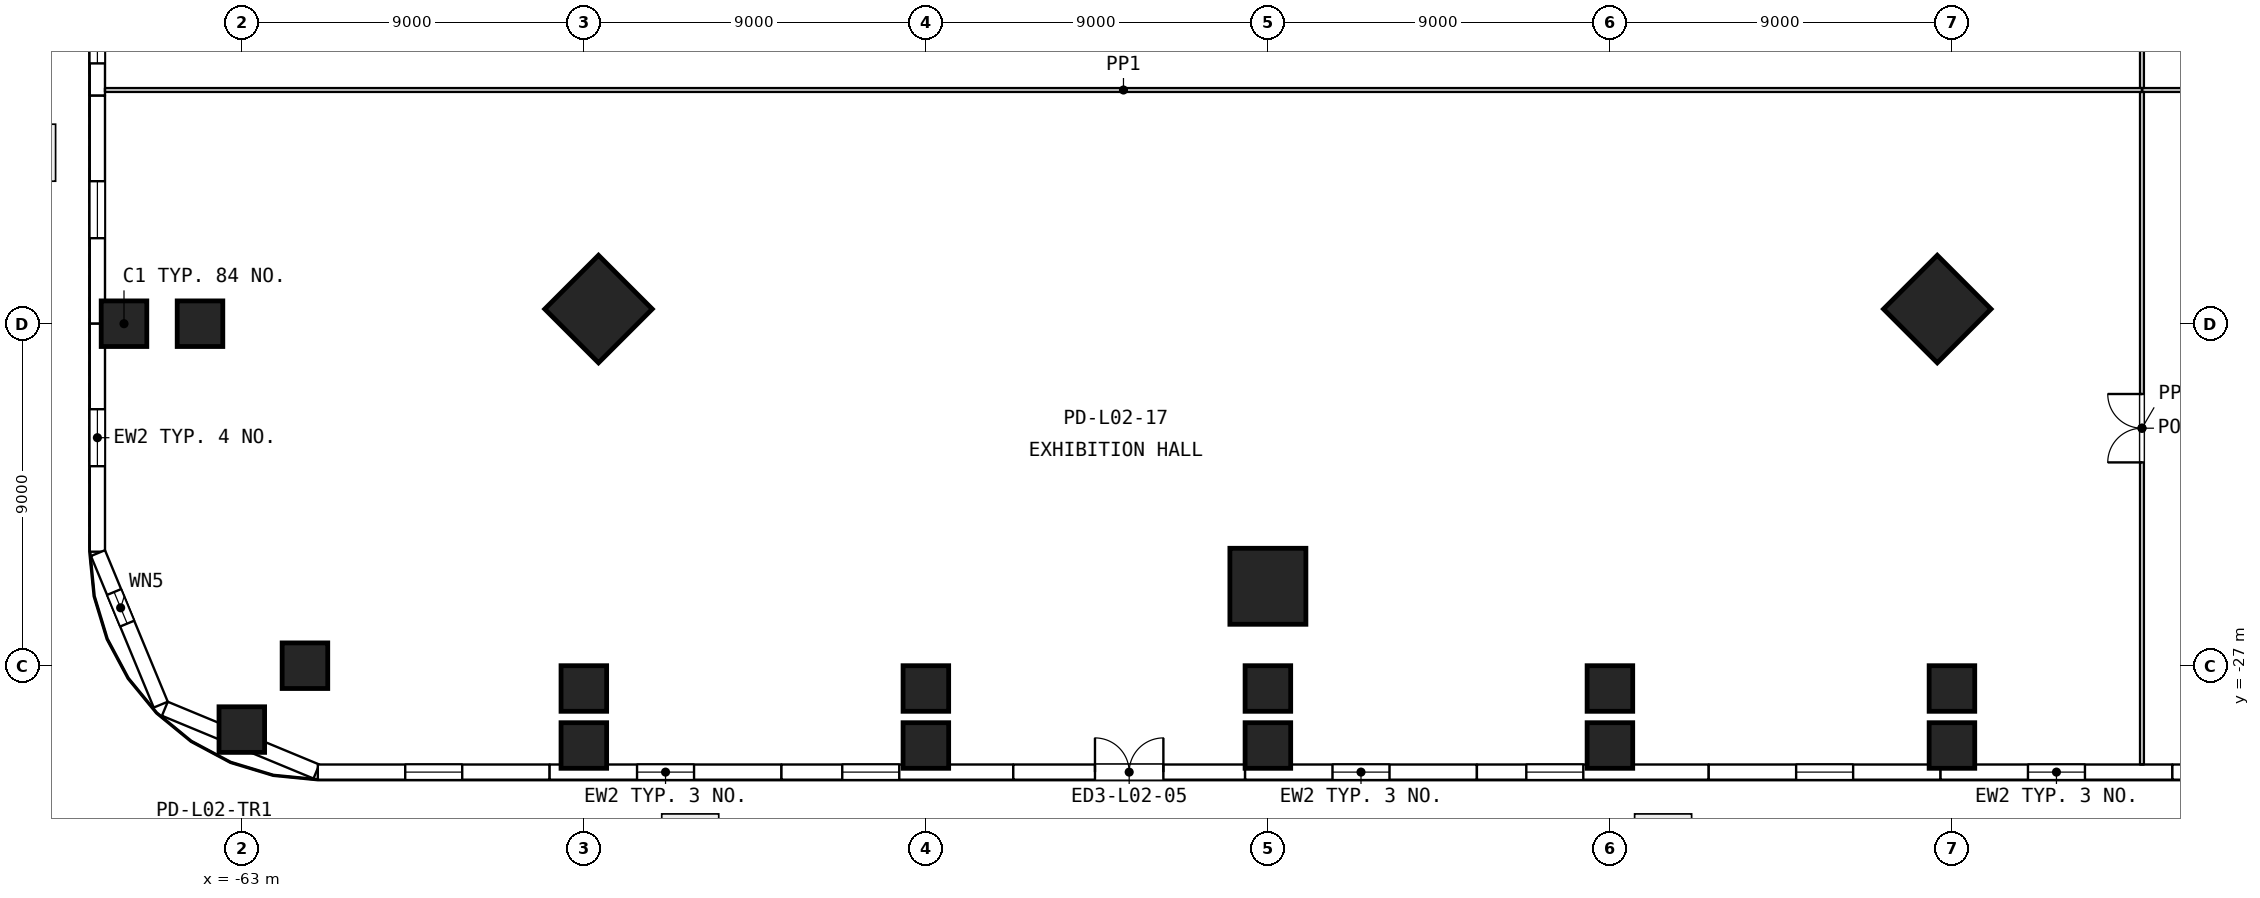
"""IFC4 building model, lengths in metres.
Left out: names, types, materials, properties, quantities, classifications, styles, units other than length and angle.
Written with IfcOpenShell. Run it as: python <this file> out.ifc"""

import sys

from ifc_helpers import new_model, si_unit, direction, frame, frame_2d, origin, origin_2d, place, context, subcontext, project, spatial, rectangle, extrude, element, fill, save


model = new_model("IFC4")
c1 = context("Model", 3, precision=1e-05, world=origin(), true_north=direction((0.0, 1.0)))
c2 = subcontext(c1, "Body", "Model", "MODEL_VIEW")
j1 = project(units=[si_unit("LENGTHUNIT", "METRE"), si_unit("PLANEANGLEUNIT", "RADIAN")], contexts=[c1])
p1 = place(None, origin())
s1 = spatial("IfcSite", under=j1, at=p1, CompositionType="ELEMENT")
p2 = place(p1, origin())
s2 = spatial("IfcBuilding", under=s1, at=p2, CompositionType="ELEMENT")
p3 = place(p2, frame((0.0, 0.0, 12.6)))
s3 = spatial("IfcBuildingStorey", under=s2, at=p3, CompositionType="ELEMENT", Elevation=12.6)
for number, where, z_axis, x_axis in (
    (1, (-66.1, -18.0, 0.0), (0.0, 0.0, 1.0), (1.0, 0.0, 0.0)),
    (2, (-64.1, -18.0, 0.0), (0.0, 0.0, 1.0), (1.0, 0.0, 0.0)),
    (3, (-63.0, -28.681, 0.0), (0.0, 0.0, 1.0), (1.0, 0.0, 0.0)),
    (4, (-61.339, -27.0, 0.0), (0.0, 0.0, 1.0), (1.0, 0.0, 0.0)),
    (5, (-54.0, -29.1, 0.0), (0.0, 0.0, 1.0), (1.0, 0.0, 0.0)),
    (6, (-54.0, -27.6, 0.0), (0.0, 0.0, 1.0), (1.0, 0.0, 0.0)),
    (7, (-45.0, -29.1, 0.0), (0.0, 0.0, 1.0), (1.0, 0.0, 0.0)),
    (8, (-45.0, -27.6, 0.0), (0.0, 0.0, 1.0), (1.0, 0.0, 0.0)),
    (9, (-36.0, -29.1, 0.0), (0.0, 0.0, 1.0), (1.0, 0.0, 0.0)),
    (10, (-36.0, -27.6, 0.0), (0.0, 0.0, 1.0), (1.0, 0.0, 0.0)),
    (11, (-27.0, -29.1, 0.0), (0.0, 0.0, 1.0), (1.0, 0.0, 0.0)),
    (12, (-27.0, -27.6, 0.0), (0.0, 0.0, 1.0), (1.0, 0.0, 0.0)),
    (13, (-18.0, -29.1, 0.0), (0.0, 0.0, 1.0), (1.0, 0.0, 0.0)),
    (14, (-18.0, -27.6, 0.0), (0.0, 0.0, 1.0), (1.0, 0.0, 0.0)),
):
    element("IfcColumn", number, at=place(p3, frame(where, z_axis=z_axis, x_axis=x_axis)), inside=s3, PredefinedType="COLUMN", context=c2, shape_type="SweptSolid", body=[
        extrude(rectangle(XDim=1.2, YDim=1.2, at=origin_2d()), origin(), (0.0, 0.0, 1.0), 5.4),
    ])
for number, where, z_axis, x_axis in (
    (15, (-53.614, -17.614, 0.0), (0.0, 0.0, 1.0), (-0.707, -0.707, 0.0)),
    (16, (-36.0, -24.91, 0.0), (0.0, 0.0, 1.0), (0.0, -1.0, 0.0)),
    (17, (-18.386, -17.614, 0.0), (0.0, 0.0, 1.0), (0.707, -0.707, 0.0)),
):
    element("IfcColumn", number, at=place(p3, frame(where, z_axis=z_axis, x_axis=x_axis)), inside=s3, PredefinedType="COLUMN", context=c2, shape_type="SweptSolid", body=[
        extrude(rectangle(XDim=2.0, YDim=2.0, at=origin_2d()), origin(), (0.0, 0.0, 1.0), 5.4),
    ])
p4 = place(p3, frame((-66.8, -6.0, 0.0), z_axis=(0.0, 0.0, 1.0), x_axis=(0.0, -1.0, 0.0)))
e18 = element("IfcWall", 18, at=p4, inside=s3, PredefinedType="SOLIDWALL", context=c2, shape_type="SweptSolid", body=[
    extrude(rectangle(XDim=6.0, YDim=0.4, at=frame_2d((3.0, 0.0))), origin(), (0.0, 0.0, 1.0), 5.1),
])
p5 = place(p4, frame((3.65, 0.0, 1.0)))
e19 = element("IfcOpeningElement", 19, at=p5, cuts=e18, PredefinedType="OPENING", context=c2, shape_type="SweptSolid", body=[
    extrude(rectangle(XDim=1.5, YDim=2.4, at=frame_2d((0.75, 1.2))), frame((0.0, 0.21, 0.0), z_axis=(0.0, -1.0, 0.0), x_axis=(1.0, 0.0, 0.0)), (0.0, 0.0, 1.0), 0.42),
])
p6 = place(p3, frame((-66.8, -12.0, 0.0), z_axis=(0.0, 0.0, 1.0), x_axis=(0.0, -1.0, 0.0)))
e20 = element("IfcWall", 20, at=p6, inside=s3, PredefinedType="SOLIDWALL", context=c2, shape_type="SweptSolid", body=[
    extrude(rectangle(XDim=6.0, YDim=0.4, at=frame_2d((3.0, 0.0))), origin(), (0.0, 0.0, 1.0), 5.1),
])
p7 = place(p6, frame((2.25, 0.0, 1.0)))
e21 = element("IfcOpeningElement", 21, at=p7, cuts=e20, PredefinedType="OPENING", context=c2, shape_type="SweptSolid", body=[
    extrude(rectangle(XDim=1.5, YDim=2.4, at=frame_2d((0.75, 1.2))), frame((0.0, 0.21, 0.0), z_axis=(0.0, -1.0, 0.0), x_axis=(1.0, 0.0, 0.0)), (0.0, 0.0, 1.0), 0.42),
])
p8 = place(p3, frame((-66.8, -18.0, 0.0), z_axis=(0.0, 0.0, 1.0), x_axis=(0.0, -1.0, 0.0)))
e22 = element("IfcWall", 22, at=p8, inside=s3, PredefinedType="SOLIDWALL", context=c2, shape_type="SweptSolid", body=[
    extrude(rectangle(XDim=6.0, YDim=0.4, at=frame_2d((3.0, 0.0))), origin(), (0.0, 0.0, 1.0), 5.1),
])
p9 = place(p8, frame((2.25, 0.0, 1.0)))
e23 = element("IfcOpeningElement", 23, at=p9, cuts=e22, PredefinedType="OPENING", context=c2, shape_type="SweptSolid", body=[
    extrude(rectangle(XDim=1.5, YDim=2.4, at=frame_2d((0.75, 1.2))), frame((0.0, 0.21, 0.0), z_axis=(0.0, -1.0, 0.0), x_axis=(1.0, 0.0, 0.0)), (0.0, 0.0, 1.0), 0.42),
])
p10 = place(p3, frame((-66.785, -24.037, 0.0), z_axis=(0.0, 0.0, 1.0), x_axis=(0.382743086333, -0.923854820772, 0.0)))
e24 = element("IfcWall", 24, at=p10, inside=s3, PredefinedType="SOLIDWALL", context=c2, shape_type="SweptSolid", body=[
    extrude(rectangle(XDim=4.316, YDim=0.4, at=frame_2d((2.158, 0.0))), origin(), (0.0, 0.0, 1.0), 5.1),
])
p11 = place(p10, frame((1.108, 0.0, 1.0)))
e25 = element("IfcOpeningElement", 25, at=p11, cuts=e24, PredefinedType="OPENING", context=c2, shape_type="SweptSolid", body=[
    extrude(rectangle(XDim=0.9, YDim=2.4, at=frame_2d((0.45, 1.2))), frame((0.0, 0.21, 0.0), z_axis=(0.0, -1.0, 0.0), x_axis=(1.0, 0.0, 0.0)), (0.0, 0.0, 1.0), 0.42),
])
p12 = place(p3, frame((-65.025, -28.133, 0.0), z_axis=(0.0, 0.0, 1.0), x_axis=(0.923854820772, -0.382743086333, 0.0)))
e26 = element("IfcWall", 26, at=p12, inside=s3, PredefinedType="SOLIDWALL", context=c2, shape_type="SweptSolid", body=[
    extrude(rectangle(XDim=4.316, YDim=0.4, at=frame_2d((2.158, 0.0))), origin(), (0.0, 0.0, 1.0), 5.1),
])
p13 = place(p3, frame((-61.0, -29.8, 0.0), z_axis=(0.0, 0.0, 1.0), x_axis=(1.0, 0.0, 0.0)))
e27 = element("IfcWall", 27, at=p13, inside=s3, PredefinedType="SOLIDWALL", context=c2, shape_type="SweptSolid", body=[
    extrude(rectangle(XDim=6.1, YDim=0.4, at=frame_2d((3.05, 0.0))), origin(), (0.0, 0.0, 1.0), 5.1),
])
p14 = place(p13, frame((2.3, 0.0, 1.0)))
e28 = element("IfcOpeningElement", 28, at=p14, cuts=e27, PredefinedType="OPENING", context=c2, shape_type="SweptSolid", body=[
    extrude(rectangle(XDim=1.5, YDim=2.4, at=frame_2d((0.75, 1.2))), frame((0.0, 0.21, 0.0), z_axis=(0.0, -1.0, 0.0), x_axis=(1.0, 0.0, 0.0)), (0.0, 0.0, 1.0), 0.42),
])
p15 = place(p3, frame((-54.9, -29.8, 0.0), z_axis=(0.0, 0.0, 1.0), x_axis=(1.0, 0.0, 0.0)))
e29 = element("IfcWall", 29, at=p15, inside=s3, PredefinedType="SOLIDWALL", context=c2, shape_type="SweptSolid", body=[
    extrude(rectangle(XDim=6.1, YDim=0.4, at=frame_2d((3.05, 0.0))), origin(), (0.0, 0.0, 1.0), 5.1),
])
p16 = place(p15, frame((2.3, 0.0, 1.0)))
e30 = element("IfcOpeningElement", 30, at=p16, cuts=e29, PredefinedType="OPENING", context=c2, shape_type="SweptSolid", body=[
    extrude(rectangle(XDim=1.5, YDim=2.4, at=frame_2d((0.75, 1.2))), frame((0.0, 0.21, 0.0), z_axis=(0.0, -1.0, 0.0), x_axis=(1.0, 0.0, 0.0)), (0.0, 0.0, 1.0), 0.42),
])
p17 = place(p3, frame((-48.8, -29.8, 0.0), z_axis=(0.0, 0.0, 1.0), x_axis=(1.0, 0.0, 0.0)))
e31 = element("IfcWall", 31, at=p17, inside=s3, PredefinedType="SOLIDWALL", context=c2, shape_type="SweptSolid", body=[
    extrude(rectangle(XDim=6.1, YDim=0.4, at=frame_2d((3.05, 0.0))), origin(), (0.0, 0.0, 1.0), 5.1),
])
p18 = place(p17, frame((1.6, 0.0, 1.0)))
e32 = element("IfcOpeningElement", 32, at=p18, cuts=e31, PredefinedType="OPENING", context=c2, shape_type="SweptSolid", body=[
    extrude(rectangle(XDim=1.5, YDim=2.4, at=frame_2d((0.75, 1.2))), frame((0.0, 0.21, 0.0), z_axis=(0.0, -1.0, 0.0), x_axis=(1.0, 0.0, 0.0)), (0.0, 0.0, 1.0), 0.42),
])
p19 = place(p3, frame((-42.7, -29.8, 0.0), z_axis=(0.0, 0.0, 1.0), x_axis=(1.0, 0.0, 0.0)))
e33 = element("IfcWall", 33, at=p19, inside=s3, PredefinedType="SOLIDWALL", context=c2, shape_type="SweptSolid", body=[
    extrude(rectangle(XDim=6.1, YDim=0.4, at=frame_2d((3.05, 0.0))), origin(), (0.0, 0.0, 1.0), 5.1),
])
p20 = place(p19, frame((2.15, 0.0, 0.0)))
e34 = element("IfcOpeningElement", 34, at=p20, cuts=e33, PredefinedType="OPENING", context=c2, shape_type="SweptSolid", body=[
    extrude(rectangle(XDim=1.8, YDim=2.4, at=frame_2d((0.9, 1.2))), frame((0.0, 0.21, 0.0), z_axis=(0.0, -1.0, 0.0), x_axis=(1.0, 0.0, 0.0)), (0.0, 0.0, 1.0), 0.42),
])
p21 = place(p3, frame((-36.6, -29.8, 0.0), z_axis=(0.0, 0.0, 1.0), x_axis=(1.0, 0.0, 0.0)))
e35 = element("IfcWall", 35, at=p21, inside=s3, PredefinedType="SOLIDWALL", context=c2, shape_type="SweptSolid", body=[
    extrude(rectangle(XDim=6.1, YDim=0.4, at=frame_2d((3.05, 0.0))), origin(), (0.0, 0.0, 1.0), 5.1),
])
p22 = place(p21, frame((2.3, 0.0, 1.0)))
e36 = element("IfcOpeningElement", 36, at=p22, cuts=e35, PredefinedType="OPENING", context=c2, shape_type="SweptSolid", body=[
    extrude(rectangle(XDim=1.5, YDim=2.4, at=frame_2d((0.75, 1.2))), frame((0.0, 0.21, 0.0), z_axis=(0.0, -1.0, 0.0), x_axis=(1.0, 0.0, 0.0)), (0.0, 0.0, 1.0), 0.42),
])
p23 = place(p3, frame((-30.5, -29.8, 0.0), z_axis=(0.0, 0.0, 1.0), x_axis=(1.0, 0.0, 0.0)))
e37 = element("IfcWall", 37, at=p23, inside=s3, PredefinedType="SOLIDWALL", context=c2, shape_type="SweptSolid", body=[
    extrude(rectangle(XDim=6.1, YDim=0.4, at=frame_2d((3.05, 0.0))), origin(), (0.0, 0.0, 1.0), 5.1),
])
p24 = place(p23, frame((1.3, 0.0, 1.0)))
e38 = element("IfcOpeningElement", 38, at=p24, cuts=e37, PredefinedType="OPENING", context=c2, shape_type="SweptSolid", body=[
    extrude(rectangle(XDim=1.5, YDim=2.4, at=frame_2d((0.75, 1.2))), frame((0.0, 0.21, 0.0), z_axis=(0.0, -1.0, 0.0), x_axis=(1.0, 0.0, 0.0)), (0.0, 0.0, 1.0), 0.42),
])
p25 = place(p3, frame((-24.4, -29.8, 0.0), z_axis=(0.0, 0.0, 1.0), x_axis=(1.0, 0.0, 0.0)))
e39 = element("IfcWall", 39, at=p25, inside=s3, PredefinedType="SOLIDWALL", context=c2, shape_type="SweptSolid", body=[
    extrude(rectangle(XDim=6.1, YDim=0.4, at=frame_2d((3.05, 0.0))), origin(), (0.0, 0.0, 1.0), 5.1),
])
p26 = place(p25, frame((2.3, 0.0, 1.0)))
e40 = element("IfcOpeningElement", 40, at=p26, cuts=e39, PredefinedType="OPENING", context=c2, shape_type="SweptSolid", body=[
    extrude(rectangle(XDim=1.5, YDim=2.4, at=frame_2d((0.75, 1.2))), frame((0.0, 0.21, 0.0), z_axis=(0.0, -1.0, 0.0), x_axis=(1.0, 0.0, 0.0)), (0.0, 0.0, 1.0), 0.42),
])
p27 = place(p3, frame((-18.3, -29.8, 0.0), z_axis=(0.0, 0.0, 1.0), x_axis=(1.0, 0.0, 0.0)))
e41 = element("IfcWall", 41, at=p27, inside=s3, PredefinedType="SOLIDWALL", context=c2, shape_type="SweptSolid", body=[
    extrude(rectangle(XDim=6.1, YDim=0.4, at=frame_2d((3.05, 0.0))), origin(), (0.0, 0.0, 1.0), 5.1),
])
p28 = place(p27, frame((2.3, 0.0, 1.0)))
e42 = element("IfcOpeningElement", 42, at=p28, cuts=e41, PredefinedType="OPENING", context=c2, shape_type="SweptSolid", body=[
    extrude(rectangle(XDim=1.5, YDim=2.4, at=frame_2d((0.75, 1.2))), frame((0.0, 0.21, 0.0), z_axis=(0.0, -1.0, 0.0), x_axis=(1.0, 0.0, 0.0)), (0.0, 0.0, 1.0), 0.42),
])
p29 = place(p3, frame((-12.2, -29.8, 0.0), z_axis=(0.0, 0.0, 1.0), x_axis=(1.0, 0.0, 0.0)))
e43 = element("IfcWall", 43, at=p29, inside=s3, PredefinedType="SOLIDWALL", context=c2, shape_type="SweptSolid", body=[
    extrude(rectangle(XDim=6.1, YDim=0.4, at=frame_2d((3.05, 0.0))), origin(), (0.0, 0.0, 1.0), 5.1),
])
p30 = place(p29, frame((1.0, 0.0, 1.0)))
e44 = element("IfcOpeningElement", 44, at=p30, cuts=e43, PredefinedType="OPENING", context=c2, shape_type="SweptSolid", body=[
    extrude(rectangle(XDim=1.5, YDim=2.4, at=frame_2d((0.75, 1.2))), frame((0.0, 0.21, 0.0), z_axis=(0.0, -1.0, 0.0), x_axis=(1.0, 0.0, 0.0)), (0.0, 0.0, 1.0), 0.42),
])
p31 = place(p3, frame((-13.0, -11.85, 0.0), z_axis=(0.0, 0.0, 1.0), x_axis=(1.0, 0.0, 0.0)))
e45 = element("IfcWall", 45, at=p31, inside=s3, PredefinedType="PARTITIONING", context=c2, shape_type="SweptSolid", body=[
    extrude(rectangle(XDim=26.0, YDim=0.1, at=frame_2d((13.0, 0.0))), origin(), (0.0, 0.0, 1.0), 5.1),
])
p32 = place(p31, frame((12.1, 0.0, 0.0)))
e46 = element("IfcOpeningElement", 46, at=p32, cuts=e45, PredefinedType="OPENING", context=c2, shape_type="SweptSolid", body=[
    extrude(rectangle(XDim=1.8, YDim=2.1, at=frame_2d((0.9, 1.05))), frame((0.0, 0.06, 0.0), z_axis=(0.0, -1.0, 0.0), x_axis=(1.0, 0.0, 0.0)), (0.0, 0.0, 1.0), 0.12),
])
p33 = place(p3, frame((-13.0, -11.8, 0.0), z_axis=(0.0, 0.0, 1.0), x_axis=(0.0, 1.0, 0.0)))
e47 = element("IfcWall", 47, at=p33, inside=s3, PredefinedType="PARTITIONING", context=c2, shape_type="SweptSolid", body=[
    extrude(rectangle(XDim=23.5, YDim=0.1, at=frame_2d((11.75, 0.0))), origin(), (0.0, 0.0, 1.0), 5.1),
])
p34 = place(p3, frame((-13.0, -29.6, 0.0), z_axis=(0.0, 0.0, 1.0), x_axis=(0.0, 1.0, 0.0)))
e48 = element("IfcWall", 48, at=p34, inside=s3, PredefinedType="PARTITIONING", context=c2, shape_type="SweptSolid", body=[
    extrude(rectangle(XDim=17.7, YDim=0.1, at=frame_2d((8.85, 0.0))), origin(), (0.0, 0.0, 1.0), 5.1),
])
p35 = place(p34, frame((7.95, 0.0, 0.0)))
e49 = element("IfcOpeningElement", 49, at=p35, cuts=e48, PredefinedType="OPENING", context=c2, shape_type="SweptSolid", body=[
    extrude(rectangle(XDim=1.8, YDim=2.1, at=frame_2d((0.9, 1.05))), frame((0.0, 0.06, 0.0), z_axis=(0.0, -1.0, 0.0), x_axis=(1.0, 0.0, 0.0)), (0.0, 0.0, 1.0), 0.12),
])
p36 = place(p3, frame((-66.6, -11.85, 0.0), z_axis=(0.0, 0.0, 1.0), x_axis=(1.0, 0.0, 0.0)))
e50 = element("IfcWall", 50, at=p36, inside=s3, PredefinedType="PARTITIONING", context=c2, shape_type="SweptSolid", body=[
    extrude(rectangle(XDim=53.6, YDim=0.1, at=frame_2d((26.8, 0.0))), origin(), (0.0, 0.0, 1.0), 5.1),
])
p37 = place(p5, origin())
e51 = element("IfcWindow", 51, at=p37, inside=s3, PartitioningType="SINGLE_PANEL", PredefinedType="WINDOW", context=c2, shape_type="SweptSolid", body=[
    extrude(rectangle(XDim=1.5, YDim=2.4, at=frame_2d((0.75, 1.2))), frame((0.0, 0.03, 0.0), z_axis=(0.0, -1.0, 0.0), x_axis=(1.0, 0.0, 0.0)), (0.0, 0.0, 1.0), 0.06),
])
fill(e19, e51)
p38 = place(p7, origin())
e52 = element("IfcWindow", 52, at=p38, inside=s3, PartitioningType="SINGLE_PANEL", PredefinedType="WINDOW", context=c2, shape_type="SweptSolid", body=[
    extrude(rectangle(XDim=1.5, YDim=2.4, at=frame_2d((0.75, 1.2))), frame((0.0, 0.03, 0.0), z_axis=(0.0, -1.0, 0.0), x_axis=(1.0, 0.0, 0.0)), (0.0, 0.0, 1.0), 0.06),
])
fill(e21, e52)
p39 = place(p9, origin())
e53 = element("IfcWindow", 53, at=p39, inside=s3, PartitioningType="SINGLE_PANEL", PredefinedType="WINDOW", context=c2, shape_type="SweptSolid", body=[
    extrude(rectangle(XDim=1.5, YDim=2.4, at=frame_2d((0.75, 1.2))), frame((0.0, 0.03, 0.0), z_axis=(0.0, -1.0, 0.0), x_axis=(1.0, 0.0, 0.0)), (0.0, 0.0, 1.0), 0.06),
])
fill(e23, e53)
p40 = place(p11, origin())
e54 = element("IfcWindow", 54, at=p40, inside=s3, PartitioningType="SINGLE_PANEL", PredefinedType="WINDOW", context=c2, shape_type="SweptSolid", body=[
    extrude(rectangle(XDim=0.9, YDim=2.4, at=frame_2d((0.45, 1.2))), frame((0.0, 0.03, 0.0), z_axis=(0.0, -1.0, 0.0), x_axis=(1.0, 0.0, 0.0)), (0.0, 0.0, 1.0), 0.06),
])
fill(e25, e54)
p41 = place(p14, origin())
e55 = element("IfcWindow", 55, at=p41, inside=s3, PartitioningType="SINGLE_PANEL", PredefinedType="WINDOW", context=c2, shape_type="SweptSolid", body=[
    extrude(rectangle(XDim=1.5, YDim=2.4, at=frame_2d((0.75, 1.2))), frame((0.0, 0.03, 0.0), z_axis=(0.0, -1.0, 0.0), x_axis=(1.0, 0.0, 0.0)), (0.0, 0.0, 1.0), 0.06),
])
fill(e28, e55)
p42 = place(p16, origin())
e56 = element("IfcWindow", 56, at=p42, inside=s3, PartitioningType="SINGLE_PANEL", PredefinedType="WINDOW", context=c2, shape_type="SweptSolid", body=[
    extrude(rectangle(XDim=1.5, YDim=2.4, at=frame_2d((0.75, 1.2))), frame((0.0, 0.03, 0.0), z_axis=(0.0, -1.0, 0.0), x_axis=(1.0, 0.0, 0.0)), (0.0, 0.0, 1.0), 0.06),
])
fill(e30, e56)
p43 = place(p18, origin())
e57 = element("IfcWindow", 57, at=p43, inside=s3, PartitioningType="SINGLE_PANEL", PredefinedType="WINDOW", context=c2, shape_type="SweptSolid", body=[
    extrude(rectangle(XDim=1.5, YDim=2.4, at=frame_2d((0.75, 1.2))), frame((0.0, 0.03, 0.0), z_axis=(0.0, -1.0, 0.0), x_axis=(1.0, 0.0, 0.0)), (0.0, 0.0, 1.0), 0.06),
])
fill(e32, e57)
p44 = place(p20, origin())
e58 = element("IfcDoor", 58, at=p44, inside=s3, OperationType="SINGLE_SWING_LEFT", PredefinedType="DOOR", context=c2, shape_type="SweptSolid", body=[
    extrude(rectangle(XDim=1.8, YDim=2.4, at=frame_2d((0.9, 1.2))), frame((0.0, 0.025, 0.0), z_axis=(0.0, -1.0, 0.0), x_axis=(1.0, 0.0, 0.0)), (0.0, 0.0, 1.0), 0.05),
])
fill(e34, e58)
p45 = place(p22, origin())
e59 = element("IfcWindow", 59, at=p45, inside=s3, PartitioningType="SINGLE_PANEL", PredefinedType="WINDOW", context=c2, shape_type="SweptSolid", body=[
    extrude(rectangle(XDim=1.5, YDim=2.4, at=frame_2d((0.75, 1.2))), frame((0.0, 0.03, 0.0), z_axis=(0.0, -1.0, 0.0), x_axis=(1.0, 0.0, 0.0)), (0.0, 0.0, 1.0), 0.06),
])
fill(e36, e59)
p46 = place(p24, origin())
e60 = element("IfcWindow", 60, at=p46, inside=s3, PartitioningType="SINGLE_PANEL", PredefinedType="WINDOW", context=c2, shape_type="SweptSolid", body=[
    extrude(rectangle(XDim=1.5, YDim=2.4, at=frame_2d((0.75, 1.2))), frame((0.0, 0.03, 0.0), z_axis=(0.0, -1.0, 0.0), x_axis=(1.0, 0.0, 0.0)), (0.0, 0.0, 1.0), 0.06),
])
fill(e38, e60)
p47 = place(p26, origin())
e61 = element("IfcWindow", 61, at=p47, inside=s3, PartitioningType="SINGLE_PANEL", PredefinedType="WINDOW", context=c2, shape_type="SweptSolid", body=[
    extrude(rectangle(XDim=1.5, YDim=2.4, at=frame_2d((0.75, 1.2))), frame((0.0, 0.03, 0.0), z_axis=(0.0, -1.0, 0.0), x_axis=(1.0, 0.0, 0.0)), (0.0, 0.0, 1.0), 0.06),
])
fill(e40, e61)
p48 = place(p28, origin())
e62 = element("IfcWindow", 62, at=p48, inside=s3, PartitioningType="SINGLE_PANEL", PredefinedType="WINDOW", context=c2, shape_type="SweptSolid", body=[
    extrude(rectangle(XDim=1.5, YDim=2.4, at=frame_2d((0.75, 1.2))), frame((0.0, 0.03, 0.0), z_axis=(0.0, -1.0, 0.0), x_axis=(1.0, 0.0, 0.0)), (0.0, 0.0, 1.0), 0.06),
])
fill(e42, e62)
p49 = place(p35, origin())
e63 = element("IfcDoor", 63, at=p49, inside=s3, OperationType="DOUBLE_DOOR_DOUBLE_SWING", PredefinedType="DOOR", context=c2, shape_type="SweptSolid", body=[
    extrude(rectangle(XDim=1.8, YDim=2.1, at=frame_2d((0.9, 1.05))), frame((0.0, 0.025, 0.0), z_axis=(0.0, -1.0, 0.0), x_axis=(1.0, 0.0, 0.0)), (0.0, 0.0, 1.0), 0.05),
])
fill(e49, e63)
save(model, sys.argv[1])
